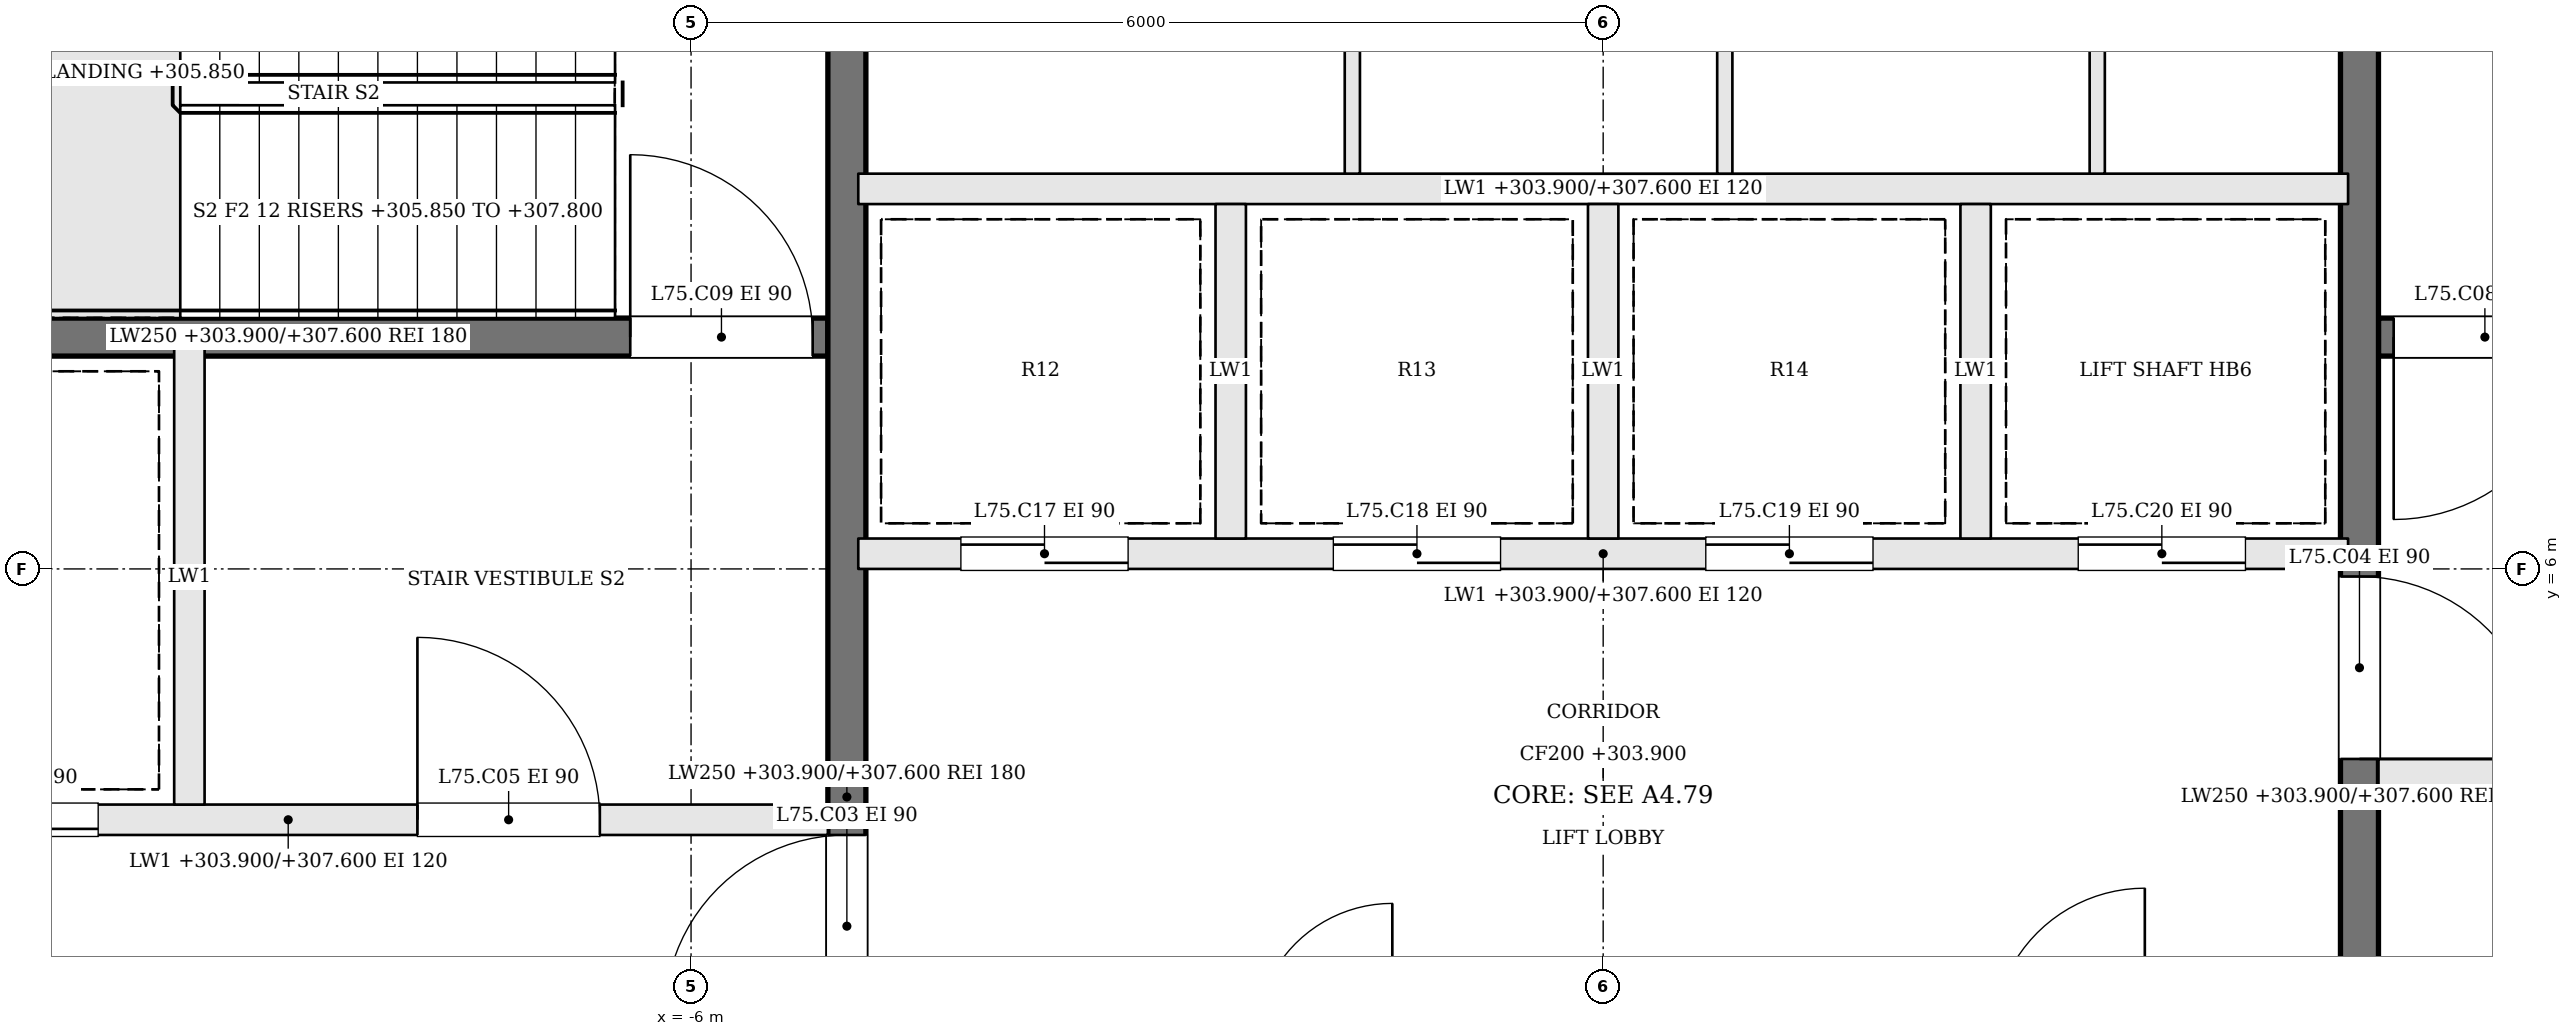
"""IFC4 building model, lengths in metres.
Left out: names, types, materials, properties, quantities, classifications, styles, units other than length and angle.
Written with IfcOpenShell. Run it as: python <this file> out.ifc"""

import sys

from ifc_helpers import new_model, si_unit, direction, frame, frame_2d, origin, place, context, subcontext, project, spatial, rectangle, extrude, element, fill, save


model = new_model("IFC4")
c1 = context("Model", 3, precision=1e-05, world=origin(), true_north=direction((0.0, 1.0)))
c2 = subcontext(c1, "Body", "Model", "MODEL_VIEW")
j1 = project(units=[si_unit("LENGTHUNIT", "METRE"), si_unit("PLANEANGLEUNIT", "RADIAN")], contexts=[c1])
p1 = place(None, origin())
s1 = spatial("IfcSite", under=j1, at=p1, CompositionType="ELEMENT")
p2 = place(p1, origin())
s2 = spatial("IfcBuilding", under=s1, at=p2, CompositionType="ELEMENT")
p3 = place(p2, frame((0.0, 0.0, 303.9)))
s3 = spatial("IfcBuildingStorey", under=s2, at=p3, CompositionType="ELEMENT", Elevation=303.9)
p4 = place(p3, frame((12.2, 7.525, 0.0), z_axis=(0.0, 0.0, 1.0), x_axis=(-1.0, 0.0, 0.0)))
e1 = element("IfcWall", 1, at=p4, inside=s3, PredefinedType="SOLIDWALL", context=c2, shape_type="SweptSolid", body=[
    extrude(rectangle(XDim=7.1, YDim=0.25, at=frame_2d((3.55, 0.0))), origin(), (0.0, 0.0, 1.0), 3.7),
])
p5 = place(p4, frame((5.8, 0.0, 0.0)))
e2 = element("IfcOpeningElement", 2, at=p5, cuts=e1, PredefinedType="OPENING", context=c2, shape_type="SweptSolid", body=[
    extrude(rectangle(XDim=1.2, YDim=2.1, at=frame_2d((0.6, 1.05))), frame((0.0, 0.135, 0.0), z_axis=(0.0, -1.0, 0.0), x_axis=(1.0, 0.0, 0.0)), (0.0, 0.0, 1.0), 0.27),
])
p6 = place(p3, frame((-12.2, 4.35, 0.0), z_axis=(0.0, 0.0, 1.0), x_axis=(1.0, 0.0, 0.0)))
e3 = element("IfcWall", 3, at=p6, inside=s3, PredefinedType="SOLIDWALL", context=c2, shape_type="SweptSolid", body=[
    extrude(rectangle(XDim=7.1, YDim=0.2, at=frame_2d((3.55, 0.0))), origin(), (0.0, 0.0, 1.0), 3.7),
])
p7 = place(p6, frame((4.4, 0.0, 0.0)))
e4 = element("IfcOpeningElement", 4, at=p7, cuts=e3, PredefinedType="OPENING", context=c2, shape_type="SweptSolid", body=[
    extrude(rectangle(XDim=1.2, YDim=2.1, at=frame_2d((0.6, 1.05))), frame((0.0, 0.11, 0.0), z_axis=(0.0, -1.0, 0.0), x_axis=(1.0, 0.0, 0.0)), (0.0, 0.0, 1.0), 0.22),
])
p8 = place(p6, frame((1.1, 0.0, 0.0)))
e5 = element("IfcOpeningElement", 5, at=p8, cuts=e3, PredefinedType="OPENING", context=c2, shape_type="SweptSolid", body=[
    extrude(rectangle(XDim=1.2, YDim=2.1, at=frame_2d((0.6, 1.05))), frame((0.0, 0.11, 0.0), z_axis=(0.0, -1.0, 0.0), x_axis=(1.0, 0.0, 0.0)), (0.0, 0.0, 1.0), 0.22),
])
p9 = place(p3, frame((12.2, 4.65, 0.0), z_axis=(0.0, 0.0, 1.0), x_axis=(-1.0, 0.0, 0.0)))
e6 = element("IfcWall", 6, at=p9, inside=s3, PredefinedType="SOLIDWALL", context=c2, shape_type="SweptSolid", body=[
    extrude(rectangle(XDim=7.1, YDim=0.2, at=frame_2d((3.55, 0.0))), origin(), (0.0, 0.0, 1.0), 3.7),
])
p10 = place(p9, frame((4.4, 0.0, 0.0)))
e7 = element("IfcOpeningElement", 7, at=p10, cuts=e6, PredefinedType="OPENING", context=c2, shape_type="SweptSolid", body=[
    extrude(rectangle(XDim=1.2, YDim=2.1, at=frame_2d((0.6, 1.05))), frame((0.0, 0.11, 0.0), z_axis=(0.0, -1.0, 0.0), x_axis=(1.0, 0.0, 0.0)), (0.0, 0.0, 1.0), 0.22),
])
p11 = place(p9, frame((1.1, 0.0, 0.0)))
e8 = element("IfcOpeningElement", 8, at=p11, cuts=e6, PredefinedType="OPENING", context=c2, shape_type="SweptSolid", body=[
    extrude(rectangle(XDim=1.2, YDim=2.1, at=frame_2d((0.6, 1.05))), frame((0.0, 0.11, 0.0), z_axis=(0.0, -1.0, 0.0), x_axis=(1.0, 0.0, 0.0)), (0.0, 0.0, 1.0), 0.22),
])
p12 = place(p3, frame((-12.2, 7.525, 0.0), z_axis=(0.0, 0.0, 1.0), x_axis=(1.0, 0.0, 0.0)))
e9 = element("IfcWall", 9, at=p12, inside=s3, PredefinedType="SOLIDWALL", context=c2, shape_type="SweptSolid", body=[
    extrude(rectangle(XDim=7.1, YDim=0.25, at=frame_2d((3.55, 0.0))), origin(), (0.0, 0.0, 1.0), 3.7),
])
p13 = place(p12, frame((5.8, 0.0, 0.0)))
e10 = element("IfcOpeningElement", 10, at=p13, cuts=e9, PredefinedType="OPENING", context=c2, shape_type="SweptSolid", body=[
    extrude(rectangle(XDim=1.2, YDim=2.1, at=frame_2d((0.6, 1.05))), frame((0.0, 0.135, 0.0), z_axis=(0.0, -1.0, 0.0), x_axis=(1.0, 0.0, 0.0)), (0.0, 0.0, 1.0), 0.27),
])
p14 = place(p3, frame((-9.3, 4.45, 0.0), z_axis=(0.0, 0.0, 1.0), x_axis=(0.0, 1.0, 0.0)))
e11 = element("IfcWall", 11, at=p14, inside=s3, PredefinedType="SOLIDWALL", context=c2, shape_type="SweptSolid", body=[
    extrude(rectangle(XDim=3.0, YDim=0.2, at=frame_2d((1.5, 0.0))), origin(), (0.0, 0.0, 1.0), 3.7),
])
p15 = place(p3, frame((-4.975, -2.2, 0.0), z_axis=(0.0, 0.0, 1.0), x_axis=(0.0, 1.0, 0.0)))
e12 = element("IfcWall", 12, at=p15, inside=s3, PredefinedType="SOLIDWALL", context=c2, shape_type="SweptSolid", body=[
    extrude(rectangle(XDim=13.4, YDim=0.25, at=frame_2d((6.7, 0.0))), origin(), (0.0, 0.0, 1.0), 3.7),
])
p16 = place(p15, frame((5.25, 0.0, 0.0)))
e13 = element("IfcOpeningElement", 13, at=p16, cuts=e12, PredefinedType="OPENING", context=c2, shape_type="SweptSolid", body=[
    extrude(rectangle(XDim=1.2, YDim=2.1, at=frame_2d((0.6, 1.05))), frame((0.0, 0.135, 0.0), z_axis=(0.0, -1.0, 0.0), x_axis=(1.0, 0.0, 0.0)), (0.0, 0.0, 1.0), 0.27),
])
p17 = place(p3, frame((4.975, 11.2, 0.0), z_axis=(0.0, 0.0, 1.0), x_axis=(0.0, -1.0, 0.0)))
e14 = element("IfcWall", 14, at=p17, inside=s3, PredefinedType="SOLIDWALL", context=c2, shape_type="SweptSolid", body=[
    extrude(rectangle(XDim=13.4, YDim=0.25, at=frame_2d((6.7, 0.0))), origin(), (0.0, 0.0, 1.0), 3.7),
])
p18 = place(p17, frame((5.25, 0.0, 0.0)))
e15 = element("IfcOpeningElement", 15, at=p18, cuts=e14, PredefinedType="OPENING", context=c2, shape_type="SweptSolid", body=[
    extrude(rectangle(XDim=1.2, YDim=2.1, at=frame_2d((0.6, 1.05))), frame((0.0, 0.135, 0.0), z_axis=(0.0, -1.0, 0.0), x_axis=(1.0, 0.0, 0.0)), (0.0, 0.0, 1.0), 0.27),
])
p19 = place(p3, frame((-4.9, 6.1, 0.0), z_axis=(0.0, 0.0, 1.0), x_axis=(1.0, 0.0, 0.0)))
e16 = element("IfcWall", 16, at=p19, inside=s3, PredefinedType="SOLIDWALL", context=c2, shape_type="SweptSolid", body=[
    extrude(rectangle(XDim=9.8, YDim=0.2, at=frame_2d((4.9, 0.0))), origin(), (0.0, 0.0, 1.0), 3.7),
])
p20 = place(p19, frame((0.675, 0.0, 0.0)))
e17 = element("IfcOpeningElement", 17, at=p20, cuts=e16, PredefinedType="OPENING", context=c2, shape_type="SweptSolid", body=[
    extrude(rectangle(XDim=1.1, YDim=2.1, at=frame_2d((0.55, 1.05))), frame((0.0, 0.11, 0.0), z_axis=(0.0, -1.0, 0.0), x_axis=(1.0, 0.0, 0.0)), (0.0, 0.0, 1.0), 0.22),
])
p21 = place(p19, frame((3.125, 0.0, 0.0)))
e18 = element("IfcOpeningElement", 18, at=p21, cuts=e16, PredefinedType="OPENING", context=c2, shape_type="SweptSolid", body=[
    extrude(rectangle(XDim=1.1, YDim=2.1, at=frame_2d((0.55, 1.05))), frame((0.0, 0.11, 0.0), z_axis=(0.0, -1.0, 0.0), x_axis=(1.0, 0.0, 0.0)), (0.0, 0.0, 1.0), 0.22),
])
p22 = place(p19, frame((5.575, 0.0, 0.0)))
e19 = element("IfcOpeningElement", 19, at=p22, cuts=e16, PredefinedType="OPENING", context=c2, shape_type="SweptSolid", body=[
    extrude(rectangle(XDim=1.1, YDim=2.1, at=frame_2d((0.55, 1.05))), frame((0.0, 0.11, 0.0), z_axis=(0.0, -1.0, 0.0), x_axis=(1.0, 0.0, 0.0)), (0.0, 0.0, 1.0), 0.22),
])
p23 = place(p19, frame((8.025, 0.0, 0.0)))
e20 = element("IfcOpeningElement", 20, at=p23, cuts=e16, PredefinedType="OPENING", context=c2, shape_type="SweptSolid", body=[
    extrude(rectangle(XDim=1.1, YDim=2.1, at=frame_2d((0.55, 1.05))), frame((0.0, 0.11, 0.0), z_axis=(0.0, -1.0, 0.0), x_axis=(1.0, 0.0, 0.0)), (0.0, 0.0, 1.0), 0.22),
])
p24 = place(p3, frame((-4.9, 8.5, 0.0), z_axis=(0.0, 0.0, 1.0), x_axis=(1.0, 0.0, 0.0)))
e21 = element("IfcWall", 21, at=p24, inside=s3, PredefinedType="SOLIDWALL", context=c2, shape_type="SweptSolid", body=[
    extrude(rectangle(XDim=9.8, YDim=0.2, at=frame_2d((4.9, 0.0))), origin(), (0.0, 0.0, 1.0), 3.7),
])
for number, where, z_axis, x_axis in (
    (22, (-2.45, 6.2, 0.0), (0.0, 0.0, 1.0), (0.0, 1.0, 0.0)),
    (23, (0.0, 6.2, 0.0), (0.0, 0.0, 1.0), (0.0, 1.0, 0.0)),
    (24, (2.45, 6.2, 0.0), (0.0, 0.0, 1.0), (0.0, 1.0, 0.0)),
):
    element("IfcWall", number, at=place(p3, frame(where, z_axis=z_axis, x_axis=x_axis)), inside=s3, PredefinedType="SOLIDWALL", context=c2, shape_type="SweptSolid", body=[
        extrude(rectangle(XDim=2.2, YDim=0.2, at=frame_2d((1.1, 0.0))), origin(), (0.0, 0.0, 1.0), 3.7),
    ])
for number, where, z_axis, x_axis in (
    (25, (-1.65, 8.6, 0.0), (0.0, 0.0, 1.0), (0.0, 1.0, 0.0)),
    (26, (0.8, 8.6, 0.0), (0.0, 0.0, 1.0), (0.0, 1.0, 0.0)),
    (27, (3.25, 8.6, 0.0), (0.0, 0.0, 1.0), (0.0, 1.0, 0.0)),
):
    element("IfcWall", number, at=place(p3, frame(where, z_axis=z_axis, x_axis=x_axis)), inside=s3, PredefinedType="PARTITIONING", context=c2, shape_type="SweptSolid", body=[
        extrude(rectangle(XDim=2.6, YDim=0.1, at=frame_2d((1.3, 0.0))), origin(), (0.0, 0.0, 1.0), 3.7),
    ])
p25 = place(p16, origin())
e28 = element("IfcDoor", 28, at=p25, inside=s3, OperationType="SINGLE_SWING_LEFT", PredefinedType="DOOR", context=c2, shape_type="SweptSolid", body=[
    extrude(rectangle(XDim=1.2, YDim=2.1, at=frame_2d((0.6, 1.05))), frame((0.0, 0.025, 0.0), z_axis=(0.0, -1.0, 0.0), x_axis=(1.0, 0.0, 0.0)), (0.0, 0.0, 1.0), 0.05),
])
fill(e13, e28)
p26 = place(p18, origin())
e29 = element("IfcDoor", 29, at=p26, inside=s3, OperationType="SINGLE_SWING_RIGHT", PredefinedType="DOOR", context=c2, shape_type="SweptSolid", body=[
    extrude(rectangle(XDim=1.2, YDim=2.1, at=frame_2d((0.6, 1.05))), frame((0.0, 0.025, 0.0), z_axis=(0.0, -1.0, 0.0), x_axis=(1.0, 0.0, 0.0)), (0.0, 0.0, 1.0), 0.05),
])
fill(e15, e29)
p27 = place(p7, origin())
e30 = element("IfcDoor", 30, at=p27, inside=s3, OperationType="SINGLE_SWING_LEFT", PredefinedType="DOOR", context=c2, shape_type="SweptSolid", body=[
    extrude(rectangle(XDim=1.2, YDim=2.1, at=frame_2d((0.6, 1.05))), frame((0.0, 0.025, 0.0), z_axis=(0.0, -1.0, 0.0), x_axis=(1.0, 0.0, 0.0)), (0.0, 0.0, 1.0), 0.05),
])
fill(e4, e30)
p28 = place(p5, origin())
e31 = element("IfcDoor", 31, at=p28, inside=s3, OperationType="SINGLE_SWING_RIGHT", PredefinedType="DOOR", context=c2, shape_type="SweptSolid", body=[
    extrude(rectangle(XDim=1.2, YDim=2.1, at=frame_2d((0.6, 1.05))), frame((0.0, 0.025, 0.0), z_axis=(0.0, -1.0, 0.0), x_axis=(1.0, 0.0, 0.0)), (0.0, 0.0, 1.0), 0.05),
])
fill(e2, e31)
p29 = place(p13, origin())
e32 = element("IfcDoor", 32, at=p29, inside=s3, OperationType="SINGLE_SWING_LEFT", PredefinedType="DOOR", context=c2, shape_type="SweptSolid", body=[
    extrude(rectangle(XDim=1.2, YDim=2.1, at=frame_2d((0.6, 1.05))), frame((0.0, 0.025, 0.0), z_axis=(0.0, -1.0, 0.0), x_axis=(1.0, 0.0, 0.0)), (0.0, 0.0, 1.0), 0.05),
])
fill(e10, e32)
p30 = place(p8, origin())
e33 = element("IfcDoor", 33, at=p30, inside=s3, OperationType="SLIDING_TO_RIGHT", PredefinedType="DOOR", context=c2, shape_type="SweptSolid", body=[
    extrude(rectangle(XDim=1.2, YDim=2.1, at=frame_2d((0.6, 1.05))), frame((0.0, 0.025, 0.0), z_axis=(0.0, -1.0, 0.0), x_axis=(1.0, 0.0, 0.0)), (0.0, 0.0, 1.0), 0.05),
])
fill(e5, e33)
p31 = place(p20, origin())
e34 = element("IfcDoor", 34, at=p31, inside=s3, OperationType="SLIDING_TO_RIGHT", PredefinedType="DOOR", context=c2, shape_type="SweptSolid", body=[
    extrude(rectangle(XDim=1.1, YDim=2.1, at=frame_2d((0.55, 1.05))), frame((0.0, 0.025, 0.0), z_axis=(0.0, -1.0, 0.0), x_axis=(1.0, 0.0, 0.0)), (0.0, 0.0, 1.0), 0.05),
])
fill(e17, e34)
p32 = place(p21, origin())
e35 = element("IfcDoor", 35, at=p32, inside=s3, OperationType="SLIDING_TO_LEFT", PredefinedType="DOOR", context=c2, shape_type="SweptSolid", body=[
    extrude(rectangle(XDim=1.1, YDim=2.1, at=frame_2d((0.55, 1.05))), frame((0.0, 0.025, 0.0), z_axis=(0.0, -1.0, 0.0), x_axis=(1.0, 0.0, 0.0)), (0.0, 0.0, 1.0), 0.05),
])
fill(e18, e35)
p33 = place(p22, origin())
e36 = element("IfcDoor", 36, at=p33, inside=s3, OperationType="SLIDING_TO_RIGHT", PredefinedType="DOOR", context=c2, shape_type="SweptSolid", body=[
    extrude(rectangle(XDim=1.1, YDim=2.1, at=frame_2d((0.55, 1.05))), frame((0.0, 0.025, 0.0), z_axis=(0.0, -1.0, 0.0), x_axis=(1.0, 0.0, 0.0)), (0.0, 0.0, 1.0), 0.05),
])
fill(e19, e36)
p34 = place(p23, origin())
e37 = element("IfcDoor", 37, at=p34, inside=s3, OperationType="SLIDING_TO_LEFT", PredefinedType="DOOR", context=c2, shape_type="SweptSolid", body=[
    extrude(rectangle(XDim=1.1, YDim=2.1, at=frame_2d((0.55, 1.05))), frame((0.0, 0.025, 0.0), z_axis=(0.0, -1.0, 0.0), x_axis=(1.0, 0.0, 0.0)), (0.0, 0.0, 1.0), 0.05),
])
fill(e20, e37)
save(model, sys.argv[1])
